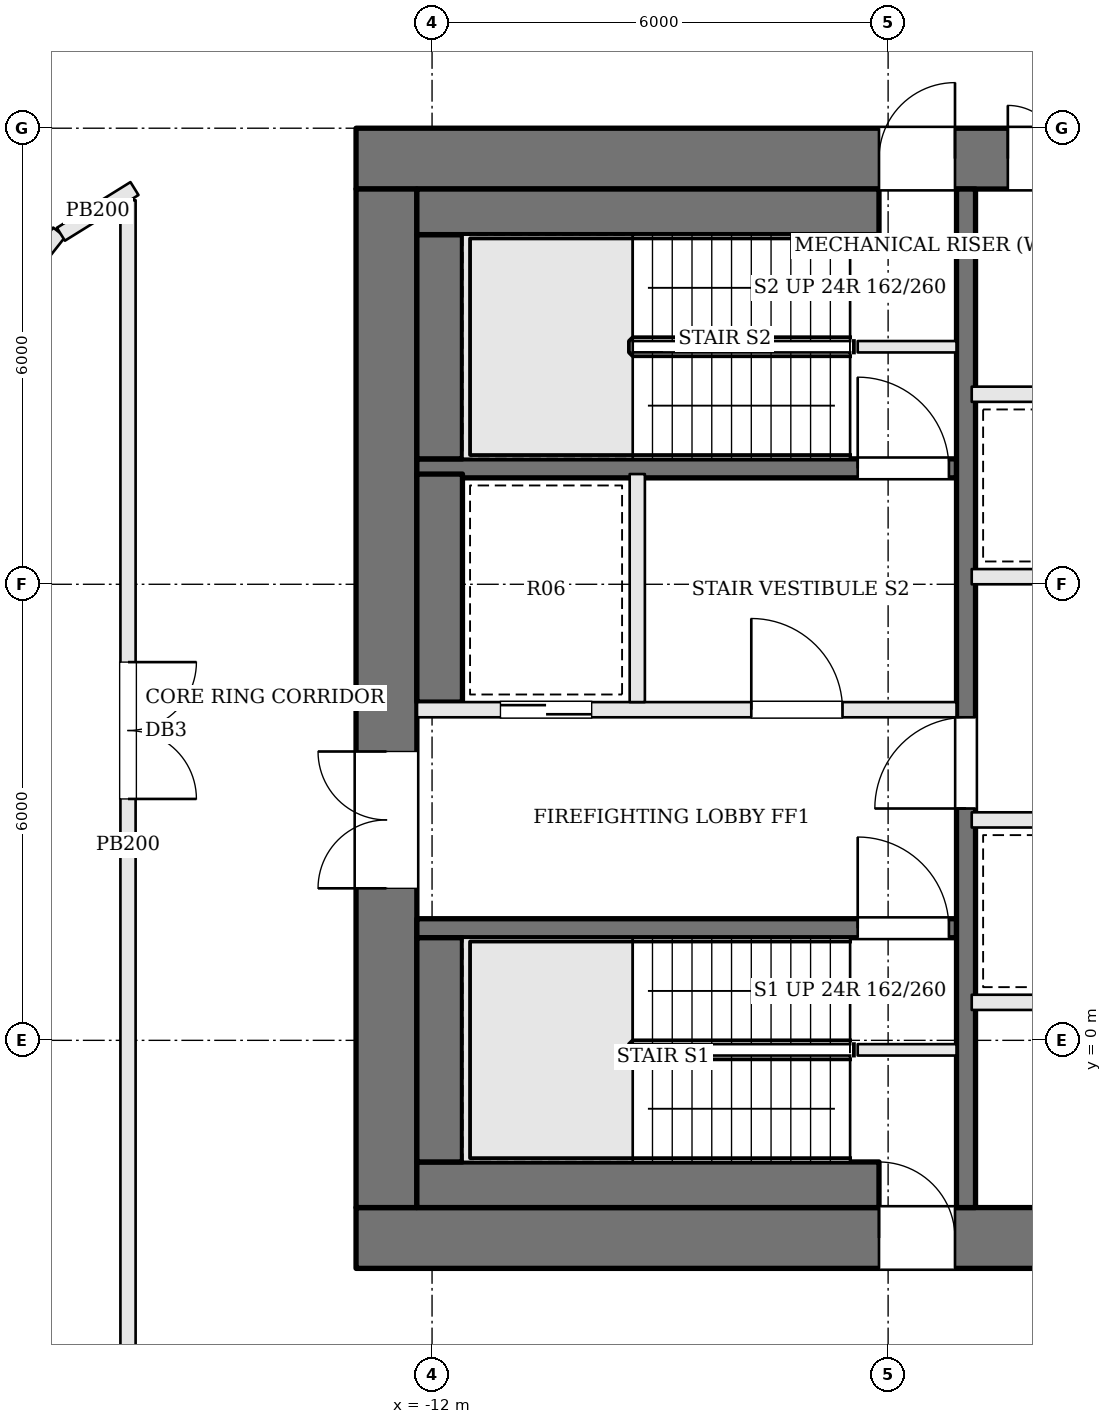
"""IFC4 building model, lengths in metres.
Left out: names, types, materials, properties, quantities, classifications, styles, units other than length and angle.
Written with IfcOpenShell. Run it as: python <this file> out.ifc"""

import sys

from ifc_helpers import new_model, si_unit, direction, frame, frame_2d, origin, place, context, subcontext, project, spatial, rectangle, extrude, element, fill, save


model = new_model("IFC4")
c1 = context("Model", 3, precision=1e-05, world=origin(), true_north=direction((0.0, 1.0)))
c2 = subcontext(c1, "Body", "Model", "MODEL_VIEW")
j1 = project(units=[si_unit("LENGTHUNIT", "METRE"), si_unit("PLANEANGLEUNIT", "RADIAN")], contexts=[c1])
p1 = place(None, origin())
s1 = spatial("IfcSite", under=j1, at=p1, CompositionType="ELEMENT")
p2 = place(p1, origin())
s2 = spatial("IfcBuilding", under=s1, at=p2, CompositionType="ELEMENT")
p3 = place(p2, frame((0.0, 0.0, 280.5)))
s3 = spatial("IfcBuildingStorey", under=s2, at=p3, CompositionType="ELEMENT", Elevation=280.5)
p4 = place(p3, frame((-13.0, 11.6, 0.0), z_axis=(0.0, 0.0, 1.0), x_axis=(1.0, 0.0, 0.0)))
e1 = element("IfcWall", 1, at=p4, inside=s3, PredefinedType="SHEAR", context=c2, shape_type="SweptSolid", body=[
    extrude(rectangle(XDim=26.0, YDim=0.8, at=frame_2d((13.0, 0.0))), origin(), (0.0, 0.0, 1.0), 3.9),
])
p5 = place(p4, frame((8.575, 0.0, 0.0)))
e2 = element("IfcOpeningElement", 2, at=p5, cuts=e1, PredefinedType="OPENING", context=c2, shape_type="SweptSolid", body=[
    extrude(rectangle(XDim=0.7, YDim=2.1, at=frame_2d((0.35, 1.05))), frame((0.0, 0.41, 0.0), z_axis=(0.0, -1.0, 0.0), x_axis=(1.0, 0.0, 0.0)), (0.0, 0.0, 1.0), 0.82),
])
p6 = place(p4, frame((10.875, 0.0, 0.0)))
e3 = element("IfcOpeningElement", 3, at=p6, cuts=e1, PredefinedType="OPENING", context=c2, shape_type="SweptSolid", body=[
    extrude(rectangle(XDim=1.0, YDim=2.1, at=frame_2d((0.5, 1.05))), frame((0.0, 0.41, 0.0), z_axis=(0.0, -1.0, 0.0), x_axis=(1.0, 0.0, 0.0)), (0.0, 0.0, 1.0), 0.82),
])
p7 = place(p4, frame((13.875, 0.0, 0.0)))
e4 = element("IfcOpeningElement", 4, at=p7, cuts=e1, PredefinedType="OPENING", context=c2, shape_type="SweptSolid", body=[
    extrude(rectangle(XDim=0.7, YDim=2.1, at=frame_2d((0.35, 1.05))), frame((0.0, 0.41, 0.0), z_axis=(0.0, -1.0, 0.0), x_axis=(1.0, 0.0, 0.0)), (0.0, 0.0, 1.0), 0.82),
])
p8 = place(p4, frame((16.325, 0.0, 0.0)))
e5 = element("IfcOpeningElement", 5, at=p8, cuts=e1, PredefinedType="OPENING", context=c2, shape_type="SweptSolid", body=[
    extrude(rectangle(XDim=0.7, YDim=2.1, at=frame_2d((0.35, 1.05))), frame((0.0, 0.41, 0.0), z_axis=(0.0, -1.0, 0.0), x_axis=(1.0, 0.0, 0.0)), (0.0, 0.0, 1.0), 0.82),
])
p9 = place(p4, frame((6.88, 0.0, 0.0)))
e6 = element("IfcOpeningElement", 6, at=p9, cuts=e1, PredefinedType="OPENING", context=c2, shape_type="SweptSolid", body=[
    extrude(rectangle(XDim=1.0, YDim=2.1, at=frame_2d((0.5, 1.05))), frame((0.0, 0.41, 0.0), z_axis=(0.0, -1.0, 0.0), x_axis=(1.0, 0.0, 0.0)), (0.0, 0.0, 1.0), 0.82),
])
p10 = place(p4, frame((18.12, 0.0, 0.0)))
e7 = element("IfcOpeningElement", 7, at=p10, cuts=e1, PredefinedType="OPENING", context=c2, shape_type="SweptSolid", body=[
    extrude(rectangle(XDim=1.0, YDim=2.1, at=frame_2d((0.5, 1.05))), frame((0.0, 0.41, 0.0), z_axis=(0.0, -1.0, 0.0), x_axis=(1.0, 0.0, 0.0)), (0.0, 0.0, 1.0), 0.82),
])
p11 = place(p3, frame((-13.0, -2.6, 0.0), z_axis=(0.0, 0.0, 1.0), x_axis=(1.0, 0.0, 0.0)))
e8 = element("IfcWall", 8, at=p11, inside=s3, PredefinedType="SHEAR", context=c2, shape_type="SweptSolid", body=[
    extrude(rectangle(XDim=26.0, YDim=0.8, at=frame_2d((13.0, 0.0))), origin(), (0.0, 0.0, 1.0), 3.9),
])
p12 = place(p11, frame((8.975, 0.0, 0.0)))
e9 = element("IfcOpeningElement", 9, at=p12, cuts=e8, PredefinedType="OPENING", context=c2, shape_type="SweptSolid", body=[
    extrude(rectangle(XDim=0.7, YDim=2.1, at=frame_2d((0.35, 1.05))), frame((0.0, 0.41, 0.0), z_axis=(0.0, -1.0, 0.0), x_axis=(1.0, 0.0, 0.0)), (0.0, 0.0, 1.0), 0.82),
])
p13 = place(p11, frame((11.675, 0.0, 0.0)))
e10 = element("IfcOpeningElement", 10, at=p13, cuts=e8, PredefinedType="OPENING", context=c2, shape_type="SweptSolid", body=[
    extrude(rectangle(XDim=1.0, YDim=2.1, at=frame_2d((0.5, 1.05))), frame((0.0, 0.41, 0.0), z_axis=(0.0, -1.0, 0.0), x_axis=(1.0, 0.0, 0.0)), (0.0, 0.0, 1.0), 0.82),
])
p14 = place(p11, frame((14.275, 0.0, 0.0)))
e11 = element("IfcOpeningElement", 11, at=p14, cuts=e8, PredefinedType="OPENING", context=c2, shape_type="SweptSolid", body=[
    extrude(rectangle(XDim=0.7, YDim=2.1, at=frame_2d((0.35, 1.05))), frame((0.0, 0.41, 0.0), z_axis=(0.0, -1.0, 0.0), x_axis=(1.0, 0.0, 0.0)), (0.0, 0.0, 1.0), 0.82),
])
p15 = place(p11, frame((16.225, 0.0, 0.0)))
e12 = element("IfcOpeningElement", 12, at=p15, cuts=e8, PredefinedType="OPENING", context=c2, shape_type="SweptSolid", body=[
    extrude(rectangle(XDim=0.9, YDim=2.1, at=frame_2d((0.45, 1.05))), frame((0.0, 0.41, 0.0), z_axis=(0.0, -1.0, 0.0), x_axis=(1.0, 0.0, 0.0)), (0.0, 0.0, 1.0), 0.82),
])
p16 = place(p11, frame((6.88, 0.0, 0.0)))
e13 = element("IfcOpeningElement", 13, at=p16, cuts=e8, PredefinedType="OPENING", context=c2, shape_type="SweptSolid", body=[
    extrude(rectangle(XDim=1.0, YDim=2.1, at=frame_2d((0.5, 1.05))), frame((0.0, 0.41, 0.0), z_axis=(0.0, -1.0, 0.0), x_axis=(1.0, 0.0, 0.0)), (0.0, 0.0, 1.0), 0.82),
])
p17 = place(p11, frame((18.12, 0.0, 0.0)))
e14 = element("IfcOpeningElement", 14, at=p17, cuts=e8, PredefinedType="OPENING", context=c2, shape_type="SweptSolid", body=[
    extrude(rectangle(XDim=1.0, YDim=2.1, at=frame_2d((0.5, 1.05))), frame((0.0, 0.41, 0.0), z_axis=(0.0, -1.0, 0.0), x_axis=(1.0, 0.0, 0.0)), (0.0, 0.0, 1.0), 0.82),
])
p18 = place(p3, frame((-12.6, -2.2, 0.0), z_axis=(0.0, 0.0, 1.0), x_axis=(0.0, 1.0, 0.0)))
e15 = element("IfcWall", 15, at=p18, inside=s3, PredefinedType="SHEAR", context=c2, shape_type="SweptSolid", body=[
    extrude(rectangle(XDim=13.4, YDim=0.8, at=frame_2d((6.7, 0.0))), origin(), (0.0, 0.0, 1.0), 3.9),
])
p19 = place(p18, frame((4.2, 0.0, 0.0)))
e16 = element("IfcOpeningElement", 16, at=p19, cuts=e15, PredefinedType="OPENING", context=c2, shape_type="SweptSolid", body=[
    extrude(rectangle(XDim=1.8, YDim=2.1, at=frame_2d((0.9, 1.05))), frame((0.0, 0.41, 0.0), z_axis=(0.0, -1.0, 0.0), x_axis=(1.0, 0.0, 0.0)), (0.0, 0.0, 1.0), 0.82),
])
for number, where, z_axis, x_axis in (
    (17, (-6.4, -0.125, 0.0), (0.0, 0.0, 1.0), (1.0, 0.0, 0.0)),
    (18, (-6.4, 9.125, 0.0), (0.0, 0.0, 1.0), (1.0, 0.0, 0.0)),
):
    element("IfcWall", number, at=place(p3, frame(where, z_axis=z_axis, x_axis=x_axis)), inside=s3, PredefinedType="SOLIDWALL", context=c2, shape_type="SweptSolid", body=[
        extrude(rectangle(XDim=1.3, YDim=0.15, at=frame_2d((0.65, 0.0))), origin(), (0.0, 0.0, 1.0), 3.7),
    ])
p20 = place(p3, frame((-12.2, 1.475, 0.0), z_axis=(0.0, 0.0, 1.0), x_axis=(1.0, 0.0, 0.0)))
e19 = element("IfcWall", 19, at=p20, inside=s3, PredefinedType="SOLIDWALL", context=c2, shape_type="SweptSolid", body=[
    extrude(rectangle(XDim=7.1, YDim=0.25, at=frame_2d((3.55, 0.0))), origin(), (0.0, 0.0, 1.0), 3.7),
])
p21 = place(p20, frame((5.8, 0.0, 0.0)))
e20 = element("IfcOpeningElement", 20, at=p21, cuts=e19, PredefinedType="OPENING", context=c2, shape_type="SweptSolid", body=[
    extrude(rectangle(XDim=1.2, YDim=2.1, at=frame_2d((0.6, 1.05))), frame((0.0, 0.135, 0.0), z_axis=(0.0, -1.0, 0.0), x_axis=(1.0, 0.0, 0.0)), (0.0, 0.0, 1.0), 0.27),
])
p22 = place(p3, frame((-12.2, 4.35, 0.0), z_axis=(0.0, 0.0, 1.0), x_axis=(1.0, 0.0, 0.0)))
e21 = element("IfcWall", 21, at=p22, inside=s3, PredefinedType="SOLIDWALL", context=c2, shape_type="SweptSolid", body=[
    extrude(rectangle(XDim=7.1, YDim=0.2, at=frame_2d((3.55, 0.0))), origin(), (0.0, 0.0, 1.0), 3.7),
])
p23 = place(p22, frame((4.4, 0.0, 0.0)))
e22 = element("IfcOpeningElement", 22, at=p23, cuts=e21, PredefinedType="OPENING", context=c2, shape_type="SweptSolid", body=[
    extrude(rectangle(XDim=1.2, YDim=2.1, at=frame_2d((0.6, 1.05))), frame((0.0, 0.11, 0.0), z_axis=(0.0, -1.0, 0.0), x_axis=(1.0, 0.0, 0.0)), (0.0, 0.0, 1.0), 0.22),
])
p24 = place(p22, frame((1.1, 0.0, 0.0)))
e23 = element("IfcOpeningElement", 23, at=p24, cuts=e21, PredefinedType="OPENING", context=c2, shape_type="SweptSolid", body=[
    extrude(rectangle(XDim=1.2, YDim=2.1, at=frame_2d((0.6, 1.05))), frame((0.0, 0.11, 0.0), z_axis=(0.0, -1.0, 0.0), x_axis=(1.0, 0.0, 0.0)), (0.0, 0.0, 1.0), 0.22),
])
p25 = place(p3, frame((-12.2, 7.525, 0.0), z_axis=(0.0, 0.0, 1.0), x_axis=(1.0, 0.0, 0.0)))
e24 = element("IfcWall", 24, at=p25, inside=s3, PredefinedType="SOLIDWALL", context=c2, shape_type="SweptSolid", body=[
    extrude(rectangle(XDim=7.1, YDim=0.25, at=frame_2d((3.55, 0.0))), origin(), (0.0, 0.0, 1.0), 3.7),
])
p26 = place(p25, frame((5.8, 0.0, 0.0)))
e25 = element("IfcOpeningElement", 25, at=p26, cuts=e24, PredefinedType="OPENING", context=c2, shape_type="SweptSolid", body=[
    extrude(rectangle(XDim=1.2, YDim=2.1, at=frame_2d((0.6, 1.05))), frame((0.0, 0.135, 0.0), z_axis=(0.0, -1.0, 0.0), x_axis=(1.0, 0.0, 0.0)), (0.0, 0.0, 1.0), 0.27),
])
p27 = place(p3, frame((-9.3, 4.45, 0.0), z_axis=(0.0, 0.0, 1.0), x_axis=(0.0, 1.0, 0.0)))
e26 = element("IfcWall", 26, at=p27, inside=s3, PredefinedType="SOLIDWALL", context=c2, shape_type="SweptSolid", body=[
    extrude(rectangle(XDim=3.0, YDim=0.2, at=frame_2d((1.5, 0.0))), origin(), (0.0, 0.0, 1.0), 3.7),
])
p28 = place(p3, frame((-4.975, -2.2, 0.0), z_axis=(0.0, 0.0, 1.0), x_axis=(0.0, 1.0, 0.0)))
e27 = element("IfcWall", 27, at=p28, inside=s3, PredefinedType="SOLIDWALL", context=c2, shape_type="SweptSolid", body=[
    extrude(rectangle(XDim=13.4, YDim=0.25, at=frame_2d((6.7, 0.0))), origin(), (0.0, 0.0, 1.0), 3.7),
])
p29 = place(p28, frame((5.25, 0.0, 0.0)))
e28 = element("IfcOpeningElement", 28, at=p29, cuts=e27, PredefinedType="OPENING", context=c2, shape_type="SweptSolid", body=[
    extrude(rectangle(XDim=1.2, YDim=2.1, at=frame_2d((0.6, 1.05))), frame((0.0, 0.135, 0.0), z_axis=(0.0, -1.0, 0.0), x_axis=(1.0, 0.0, 0.0)), (0.0, 0.0, 1.0), 0.27),
])
p30 = place(p3, frame((-12.2, -1.9, 0.0), z_axis=(0.0, 0.0, 1.0), x_axis=(1.0, 0.0, 0.0)))
e29 = element("IfcWall", 29, at=p30, inside=s3, PredefinedType="SOLIDWALL", context=c2, shape_type="SweptSolid", body=[
    extrude(rectangle(XDim=6.08, YDim=0.6, at=frame_2d((3.04, 0.0))), origin(), (0.0, 0.0, 1.0), 3.7),
])
p31 = place(p3, frame((-11.9, -1.6, 0.0), z_axis=(0.0, 0.0, 1.0), x_axis=(0.0, 1.0, 0.0)))
e30 = element("IfcWall", 30, at=p31, inside=s3, PredefinedType="SOLIDWALL", context=c2, shape_type="SweptSolid", body=[
    extrude(rectangle(XDim=2.95, YDim=0.6, at=frame_2d((1.475, 0.0))), origin(), (0.0, 0.0, 1.0), 3.7),
])
p32 = place(p3, frame((-11.9, 4.45, 0.0), z_axis=(0.0, 0.0, 1.0), x_axis=(0.0, 1.0, 0.0)))
e31 = element("IfcWall", 31, at=p32, inside=s3, PredefinedType="SOLIDWALL", context=c2, shape_type="SweptSolid", body=[
    extrude(rectangle(XDim=3.0, YDim=0.6, at=frame_2d((1.5, 0.0))), origin(), (0.0, 0.0, 1.0), 3.7),
])
p33 = place(p3, frame((-11.9, 7.65, 0.0), z_axis=(0.0, 0.0, 1.0), x_axis=(0.0, 1.0, 0.0)))
e32 = element("IfcWall", 32, at=p33, inside=s3, PredefinedType="SOLIDWALL", context=c2, shape_type="SweptSolid", body=[
    extrude(rectangle(XDim=2.95, YDim=0.6, at=frame_2d((1.475, 0.0))), origin(), (0.0, 0.0, 1.0), 3.7),
])
p34 = place(p3, frame((-12.2, 10.9, 0.0), z_axis=(0.0, 0.0, 1.0), x_axis=(1.0, 0.0, 0.0)))
e33 = element("IfcWall", 33, at=p34, inside=s3, PredefinedType="SOLIDWALL", context=c2, shape_type="SweptSolid", body=[
    extrude(rectangle(XDim=6.08, YDim=0.6, at=frame_2d((3.04, 0.0))), origin(), (0.0, 0.0, 1.0), 3.7),
])
p35 = place(p3, frame((-4.9, 0.5, 0.0), z_axis=(0.0, 0.0, 1.0), x_axis=(1.0, 0.0, 0.0)))
e34 = element("IfcWall", 34, at=p35, inside=s3, PredefinedType="SOLIDWALL", context=c2, shape_type="SweptSolid", body=[
    extrude(rectangle(XDim=9.8, YDim=0.2, at=frame_2d((4.9, 0.0))), origin(), (0.0, 0.0, 1.0), 3.7),
])
p36 = place(p3, frame((-4.9, 2.9, 0.0), z_axis=(0.0, 0.0, 1.0), x_axis=(1.0, 0.0, 0.0)))
e35 = element("IfcWall", 35, at=p36, inside=s3, PredefinedType="SOLIDWALL", context=c2, shape_type="SweptSolid", body=[
    extrude(rectangle(XDim=9.8, YDim=0.2, at=frame_2d((4.9, 0.0))), origin(), (0.0, 0.0, 1.0), 3.7),
])
p37 = place(p36, frame((2.613, 0.0, 0.0)))
e36 = element("IfcOpeningElement", 36, at=p37, cuts=e35, PredefinedType="OPENING", context=c2, shape_type="SweptSolid", body=[
    extrude(rectangle(XDim=0.9, YDim=2.1, at=frame_2d((0.45, 1.05))), frame((0.0, 0.11, 0.0), z_axis=(0.0, -1.0, 0.0), x_axis=(1.0, 0.0, 0.0)), (0.0, 0.0, 1.0), 0.22),
])
p38 = place(p36, frame((7.463, 0.0, 0.0)))
e37 = element("IfcOpeningElement", 37, at=p38, cuts=e35, PredefinedType="OPENING", context=c2, shape_type="SweptSolid", body=[
    extrude(rectangle(XDim=1.0, YDim=2.1, at=frame_2d((0.5, 1.05))), frame((0.0, 0.11, 0.0), z_axis=(0.0, -1.0, 0.0), x_axis=(1.0, 0.0, 0.0)), (0.0, 0.0, 1.0), 0.22),
])
for number, where, z_axis, x_axis in (
    (38, (-4.9, 6.1, 0.0), (0.0, 0.0, 1.0), (1.0, 0.0, 0.0)),
    (39, (-4.9, 8.5, 0.0), (0.0, 0.0, 1.0), (1.0, 0.0, 0.0)),
):
    element("IfcWall", number, at=place(p3, frame(where, z_axis=z_axis, x_axis=x_axis)), inside=s3, PredefinedType="SOLIDWALL", context=c2, shape_type="SweptSolid", body=[
        extrude(rectangle(XDim=9.8, YDim=0.2, at=frame_2d((4.9, 0.0))), origin(), (0.0, 0.0, 1.0), 3.7),
    ])
p39 = place(p3, frame((-19.849, 6.895, 0.0), z_axis=(0.0, 0.0, 1.0), x_axis=(0.618811760178, 0.785539308669, 0.0)))
e40 = element("IfcWall", 40, at=p39, inside=s3, PredefinedType="PARTITIONING", context=c2, shape_type="SweptSolid", body=[
    extrude(rectangle(XDim=4.756, YDim=0.2, at=frame_2d((2.378, 0.0))), origin(), (0.0, 0.0, 1.0), 3.7),
])
p40 = place(p3, frame((-16.883, 10.605, 0.0), z_axis=(0.0, 0.0, 1.0), x_axis=(0.84954745962, 0.527512193085, 0.0)))
e41 = element("IfcWall", 41, at=p40, inside=s3, PredefinedType="PARTITIONING", context=c2, shape_type="SweptSolid", body=[
    extrude(rectangle(XDim=1.139, YDim=0.2, at=frame_2d((0.57, 0.0))), origin(), (0.0, 0.0, 1.0), 3.7),
])
p41 = place(p3, frame((-16.0, 11.053, 0.0), z_axis=(0.0, 0.0, 1.0), x_axis=(0.0, -1.0, 0.0)))
e42 = element("IfcWall", 42, at=p41, inside=s3, PredefinedType="PARTITIONING", context=c2, shape_type="SweptSolid", body=[
    extrude(rectangle(XDim=16.953, YDim=0.2, at=frame_2d((8.477, 0.0))), origin(), (0.0, 0.0, 1.0), 3.7),
])
p42 = place(p41, frame((6.077, 0.0, 0.0)))
e43 = element("IfcOpeningElement", 43, at=p42, cuts=e42, PredefinedType="OPENING", context=c2, shape_type="SweptSolid", body=[
    extrude(rectangle(XDim=1.8, YDim=2.1, at=frame_2d((0.9, 1.05))), frame((0.0, 0.11, 0.0), z_axis=(0.0, -1.0, 0.0), x_axis=(1.0, 0.0, 0.0)), (0.0, 0.0, 1.0), 0.22),
])
p43 = place(p19, origin())
e44 = element("IfcDoor", 44, at=p43, inside=s3, OperationType="DOUBLE_DOOR_SINGLE_SWING", PredefinedType="DOOR", context=c2, shape_type="SweptSolid", body=[
    extrude(rectangle(XDim=1.8, YDim=2.1, at=frame_2d((0.9, 1.05))), frame((0.0, 0.025, 0.0), z_axis=(0.0, -1.0, 0.0), x_axis=(1.0, 0.0, 0.0)), (0.0, 0.0, 1.0), 0.05),
])
fill(e16, e44)
p44 = place(p29, origin())
e45 = element("IfcDoor", 45, at=p44, inside=s3, OperationType="SINGLE_SWING_LEFT", PredefinedType="DOOR", context=c2, shape_type="SweptSolid", body=[
    extrude(rectangle(XDim=1.2, YDim=2.1, at=frame_2d((0.6, 1.05))), frame((0.0, 0.025, 0.0), z_axis=(0.0, -1.0, 0.0), x_axis=(1.0, 0.0, 0.0)), (0.0, 0.0, 1.0), 0.05),
])
fill(e28, e45)
p45 = place(p23, origin())
e46 = element("IfcDoor", 46, at=p45, inside=s3, OperationType="SINGLE_SWING_LEFT", PredefinedType="DOOR", context=c2, shape_type="SweptSolid", body=[
    extrude(rectangle(XDim=1.2, YDim=2.1, at=frame_2d((0.6, 1.05))), frame((0.0, 0.025, 0.0), z_axis=(0.0, -1.0, 0.0), x_axis=(1.0, 0.0, 0.0)), (0.0, 0.0, 1.0), 0.05),
])
fill(e22, e46)
p46 = place(p21, origin())
e47 = element("IfcDoor", 47, at=p46, inside=s3, OperationType="SINGLE_SWING_LEFT", PredefinedType="DOOR", context=c2, shape_type="SweptSolid", body=[
    extrude(rectangle(XDim=1.2, YDim=2.1, at=frame_2d((0.6, 1.05))), frame((0.0, 0.025, 0.0), z_axis=(0.0, -1.0, 0.0), x_axis=(1.0, 0.0, 0.0)), (0.0, 0.0, 1.0), 0.05),
])
fill(e20, e47)
p47 = place(p26, origin())
e48 = element("IfcDoor", 48, at=p47, inside=s3, OperationType="SINGLE_SWING_LEFT", PredefinedType="DOOR", context=c2, shape_type="SweptSolid", body=[
    extrude(rectangle(XDim=1.2, YDim=2.1, at=frame_2d((0.6, 1.05))), frame((0.0, 0.025, 0.0), z_axis=(0.0, -1.0, 0.0), x_axis=(1.0, 0.0, 0.0)), (0.0, 0.0, 1.0), 0.05),
])
fill(e25, e48)
p48 = place(p24, origin())
e49 = element("IfcDoor", 49, at=p48, inside=s3, OperationType="SLIDING_TO_RIGHT", PredefinedType="DOOR", context=c2, shape_type="SweptSolid", body=[
    extrude(rectangle(XDim=1.2, YDim=2.1, at=frame_2d((0.6, 1.05))), frame((0.0, 0.025, 0.0), z_axis=(0.0, -1.0, 0.0), x_axis=(1.0, 0.0, 0.0)), (0.0, 0.0, 1.0), 0.05),
])
fill(e23, e49)
p49 = place(p5, origin())
e50 = element("IfcDoor", 50, at=p49, inside=s3, OperationType="SINGLE_SWING_LEFT", PredefinedType="DOOR", context=c2, shape_type="SweptSolid", body=[
    extrude(rectangle(XDim=0.7, YDim=2.1, at=frame_2d((0.35, 1.05))), frame((0.0, 0.025, 0.0), z_axis=(0.0, -1.0, 0.0), x_axis=(1.0, 0.0, 0.0)), (0.0, 0.0, 1.0), 0.05),
])
fill(e2, e50)
p50 = place(p16, origin())
e51 = element("IfcDoor", 51, at=p50, inside=s3, OperationType="SINGLE_SWING_LEFT", PredefinedType="DOOR", context=c2, shape_type="SweptSolid", body=[
    extrude(rectangle(XDim=1.0, YDim=2.1, at=frame_2d((0.5, 1.05))), frame((0.0, 0.025, 0.0), z_axis=(0.0, -1.0, 0.0), x_axis=(1.0, 0.0, 0.0)), (0.0, 0.0, 1.0), 0.05),
])
fill(e13, e51)
p51 = place(p9, origin())
e52 = element("IfcDoor", 52, at=p51, inside=s3, OperationType="SINGLE_SWING_RIGHT", PredefinedType="DOOR", context=c2, shape_type="SweptSolid", body=[
    extrude(rectangle(XDim=1.0, YDim=2.1, at=frame_2d((0.5, 1.05))), frame((0.0, 0.025, 0.0), z_axis=(0.0, -1.0, 0.0), x_axis=(1.0, 0.0, 0.0)), (0.0, 0.0, 1.0), 0.05),
])
fill(e6, e52)
p52 = place(p42, origin())
e53 = element("IfcDoor", 53, at=p52, inside=s3, OperationType="DOUBLE_DOOR_SINGLE_SWING", PredefinedType="DOOR", context=c2, shape_type="SweptSolid", body=[
    extrude(rectangle(XDim=1.8, YDim=2.1, at=frame_2d((0.9, 1.05))), frame((0.0, 0.025, 0.0), z_axis=(0.0, -1.0, 0.0), x_axis=(1.0, 0.0, 0.0)), (0.0, 0.0, 1.0), 0.05),
])
fill(e43, e53)
save(model, sys.argv[1])
